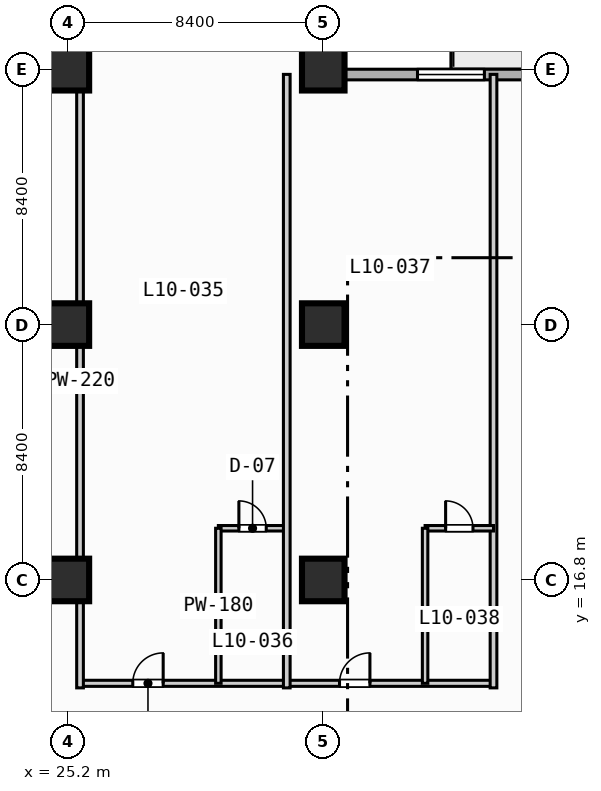
"""IFC4 building model, lengths in metres.
Left out: names, types, materials, properties, quantities, classifications, styles, units other than length and angle.
Written with IfcOpenShell. Run it as: python <this file> out.ifc"""

import sys

from ifc_helpers import new_model, si_unit, direction, frame, frame_2d, origin, origin_2d, place, context, subcontext, project, spatial, rectangle, extrude, element, fill, save


model = new_model("IFC4")
c1 = context("Model", 3, precision=1e-05, world=origin(), true_north=direction((0.0, 1.0)))
c2 = subcontext(c1, "Body", "Model", "MODEL_VIEW")
j1 = project(units=[si_unit("LENGTHUNIT", "METRE"), si_unit("PLANEANGLEUNIT", "RADIAN")], contexts=[c1])
p1 = place(None, origin())
s1 = spatial("IfcSite", under=j1, at=p1, CompositionType="ELEMENT")
p2 = place(p1, origin())
s2 = spatial("IfcBuilding", under=s1, at=p2, CompositionType="ELEMENT")
p3 = place(p2, frame((0.0, 0.0, 47.2)))
s3 = spatial("IfcBuildingStorey", under=s2, at=p3, CompositionType="ELEMENT", Elevation=47.2)
for number, where, z_axis, x_axis in (
    (1, (25.2, 16.8, 0.0), (0.0, 0.0, 1.0), (1.0, 0.0, 0.0)),
    (2, (25.2, 25.2, 0.0), (0.0, 0.0, 1.0), (1.0, 0.0, 0.0)),
    (3, (25.2, 33.6, 0.0), (0.0, 0.0, 1.0), (1.0, 0.0, 0.0)),
    (4, (33.6, 16.8, 0.0), (0.0, 0.0, 1.0), (1.0, 0.0, 0.0)),
    (5, (33.6, 25.2, 0.0), (0.0, 0.0, 1.0), (1.0, 0.0, 0.0)),
    (6, (33.6, 33.6, 0.0), (0.0, 0.0, 1.0), (1.0, 0.0, 0.0)),
):
    element("IfcColumn", number, at=place(p3, frame(where, z_axis=z_axis, x_axis=x_axis)), inside=s3, PredefinedType="COLUMN", context=c2, shape_type="SweptSolid", body=[
        extrude(rectangle(XDim=1.4, YDim=1.4, at=origin_2d()), origin(), (0.0, 0.0, 1.0), 3.8),
    ])
p4 = place(p3, frame((33.425, 89.225, 0.0), z_axis=(0.0, 0.0, 1.0), x_axis=(0.0, -1.0, 0.0)))
e7 = element("IfcWall", 7, at=p4, inside=s3, PredefinedType="STANDARD", context=c2, shape_type="SweptSolid", body=[
    extrude(rectangle(XDim=55.8, YDim=0.35, at=frame_2d((27.9, 0.0))), origin(), (0.0, 0.0, 1.0), 3.55),
])
p5 = place(p4, frame((16.725, 0.0, 0.85)))
e8 = element("IfcOpeningElement", 8, at=p5, cuts=e7, PredefinedType="OPENING", context=c2, shape_type="SweptSolid", body=[
    extrude(rectangle(XDim=2.2, YDim=1.8, at=frame_2d((1.1, 0.9))), frame((0.0, 0.185, 0.0), z_axis=(0.0, -1.0, 0.0), x_axis=(1.0, 0.0, 0.0)), (0.0, 0.0, 1.0), 0.37),
])
p6 = place(p4, frame((8.325, 0.0, 0.85)))
e9 = element("IfcOpeningElement", 9, at=p6, cuts=e7, PredefinedType="OPENING", context=c2, shape_type="SweptSolid", body=[
    extrude(rectangle(XDim=2.2, YDim=1.8, at=frame_2d((1.1, 0.9))), frame((0.0, 0.185, 0.0), z_axis=(0.0, -1.0, 0.0), x_axis=(1.0, 0.0, 0.0)), (0.0, 0.0, 1.0), 0.37),
])
p7 = place(p3, frame((33.425, 33.425, 0.0), z_axis=(0.0, 0.0, 1.0), x_axis=(1.0, 0.0, 0.0)))
e10 = element("IfcWall", 10, at=p7, inside=s3, PredefinedType="STANDARD", context=c2, shape_type="SweptSolid", body=[
    extrude(rectangle(XDim=55.8, YDim=0.35, at=frame_2d((27.9, 0.0))), origin(), (0.0, 0.0, 1.0), 3.55),
])
p8 = place(p7, frame((12.075, 0.0, 0.0)))
e11 = element("IfcOpeningElement", 11, at=p8, cuts=e10, PredefinedType="OPENING", context=c2, shape_type="SweptSolid", body=[
    extrude(rectangle(XDim=1.4, YDim=2.2, at=frame_2d((0.7, 1.1))), frame((0.0, 0.185, 0.0), z_axis=(0.0, -1.0, 0.0), x_axis=(1.0, 0.0, 0.0)), (0.0, 0.0, 1.0), 0.37),
])
p9 = place(p7, frame((3.275, 0.0, 0.85)))
e12 = element("IfcOpeningElement", 12, at=p9, cuts=e10, PredefinedType="OPENING", context=c2, shape_type="SweptSolid", body=[
    extrude(rectangle(XDim=2.2, YDim=1.8, at=frame_2d((1.1, 0.9))), frame((0.0, 0.185, 0.0), z_axis=(0.0, -1.0, 0.0), x_axis=(1.0, 0.0, 0.0)), (0.0, 0.0, 1.0), 0.37),
])
p10 = place(p3, frame((25.6, 13.4, 0.0), z_axis=(0.0, 0.0, 1.0), x_axis=(1.0, 0.0, 0.0)))
e13 = element("IfcWall", 13, at=p10, inside=s3, PredefinedType="PARTITIONING", context=c2, shape_type="SweptSolid", body=[
    extrude(rectangle(XDim=13.6, YDim=0.2, at=frame_2d((6.8, 0.0))), origin(), (0.0, 0.0, 1.0), 3.55),
])
p11 = place(p10, frame((1.735, 0.0, 0.0)))
e14 = element("IfcOpeningElement", 14, at=p11, cuts=e13, PredefinedType="OPENING", context=c2, shape_type="SweptSolid", body=[
    extrude(rectangle(XDim=1.0, YDim=2.15, at=frame_2d((0.5, 1.075))), frame((0.0, 0.11, 0.0), z_axis=(0.0, -1.0, 0.0), x_axis=(1.0, 0.0, 0.0)), (0.0, 0.0, 1.0), 0.22),
])
p12 = place(p10, frame((8.535, 0.0, 0.0)))
e15 = element("IfcOpeningElement", 15, at=p12, cuts=e13, PredefinedType="OPENING", context=c2, shape_type="SweptSolid", body=[
    extrude(rectangle(XDim=1.0, YDim=2.15, at=frame_2d((0.5, 1.075))), frame((0.0, 0.11, 0.0), z_axis=(0.0, -1.0, 0.0), x_axis=(1.0, 0.0, 0.0)), (0.0, 0.0, 1.0), 0.22),
])
p13 = place(p3, frame((25.6, 13.25, 0.0), z_axis=(0.0, 0.0, 1.0), x_axis=(0.0, 1.0, 0.0)))
e16 = element("IfcWall", 16, at=p13, inside=s3, PredefinedType="PARTITIONING", context=c2, shape_type="SweptSolid", body=[
    extrude(rectangle(XDim=20.18, YDim=0.22, at=frame_2d((10.09, 0.0))), origin(), (0.0, 0.0, 1.0), 3.55),
])
p14 = place(p3, frame((30.15, 18.5, 0.0), z_axis=(0.0, 0.0, 1.0), x_axis=(1.0, 0.0, 0.0)))
e17 = element("IfcWall", 17, at=p14, inside=s3, PredefinedType="PLUMBINGWALL", context=c2, shape_type="SweptSolid", body=[
    extrude(rectangle(XDim=2.25, YDim=0.18, at=frame_2d((1.125, 0.0))), origin(), (0.0, 0.0, 1.0), 3.55),
])
p15 = place(p14, frame((0.675, 0.0, 0.0)))
e18 = element("IfcOpeningElement", 18, at=p15, cuts=e17, PredefinedType="OPENING", context=c2, shape_type="SweptSolid", body=[
    extrude(rectangle(XDim=0.9, YDim=2.1, at=frame_2d((0.45, 1.05))), frame((0.0, 0.1, 0.0), z_axis=(0.0, -1.0, 0.0), x_axis=(1.0, 0.0, 0.0)), (0.0, 0.0, 1.0), 0.2),
])
p16 = place(p3, frame((30.15, 13.4, 0.0), z_axis=(0.0, 0.0, 1.0), x_axis=(0.0, 1.0, 0.0)))
e19 = element("IfcWall", 19, at=p16, inside=s3, PredefinedType="PLUMBINGWALL", context=c2, shape_type="SweptSolid", body=[
    extrude(rectangle(XDim=5.1, YDim=0.18, at=frame_2d((2.55, 0.0))), origin(), (0.0, 0.0, 1.0), 3.55),
])
for number, where, z_axis, x_axis in (
    (20, (32.4, 13.25, 0.0), (0.0, 0.0, 1.0), (0.0, 1.0, 0.0)),
    (21, (39.2, 13.25, 0.0), (0.0, 0.0, 1.0), (0.0, 1.0, 0.0)),
):
    element("IfcWall", number, at=place(p3, frame(where, z_axis=z_axis, x_axis=x_axis)), inside=s3, PredefinedType="PARTITIONING", context=c2, shape_type="SweptSolid", body=[
        extrude(rectangle(XDim=20.18, YDim=0.22, at=frame_2d((10.09, 0.0))), origin(), (0.0, 0.0, 1.0), 3.55),
    ])
p17 = place(p3, frame((36.95, 18.5, 0.0), z_axis=(0.0, 0.0, 1.0), x_axis=(1.0, 0.0, 0.0)))
e22 = element("IfcWall", 22, at=p17, inside=s3, PredefinedType="PLUMBINGWALL", context=c2, shape_type="SweptSolid", body=[
    extrude(rectangle(XDim=2.25, YDim=0.18, at=frame_2d((1.125, 0.0))), origin(), (0.0, 0.0, 1.0), 3.55),
])
p18 = place(p17, frame((0.675, 0.0, 0.0)))
e23 = element("IfcOpeningElement", 23, at=p18, cuts=e22, PredefinedType="OPENING", context=c2, shape_type="SweptSolid", body=[
    extrude(rectangle(XDim=0.9, YDim=2.1, at=frame_2d((0.45, 1.05))), frame((0.0, 0.1, 0.0), z_axis=(0.0, -1.0, 0.0), x_axis=(1.0, 0.0, 0.0)), (0.0, 0.0, 1.0), 0.2),
])
p19 = place(p3, frame((36.95, 13.4, 0.0), z_axis=(0.0, 0.0, 1.0), x_axis=(0.0, 1.0, 0.0)))
e24 = element("IfcWall", 24, at=p19, inside=s3, PredefinedType="PLUMBINGWALL", context=c2, shape_type="SweptSolid", body=[
    extrude(rectangle(XDim=5.1, YDim=0.18, at=frame_2d((2.55, 0.0))), origin(), (0.0, 0.0, 1.0), 3.55),
])
p20 = place(p9, origin())
e25 = element("IfcWindow", 25, at=p20, inside=s3, PartitioningType="SINGLE_PANEL", PredefinedType="WINDOW", context=c2, shape_type="SweptSolid", body=[
    extrude(rectangle(XDim=2.2, YDim=1.8, at=frame_2d((1.1, 0.9))), frame((0.0, 0.03, 0.0), z_axis=(0.0, -1.0, 0.0), x_axis=(1.0, 0.0, 0.0)), (0.0, 0.0, 1.0), 0.06),
])
fill(e12, e25)
p21 = place(p11, origin())
e26 = element("IfcDoor", 26, at=p21, inside=s3, OperationType="SINGLE_SWING_RIGHT", PredefinedType="DOOR", context=c2, shape_type="SweptSolid", body=[
    extrude(rectangle(XDim=1.0, YDim=2.15, at=frame_2d((0.5, 1.075))), frame((0.0, 0.025, 0.0), z_axis=(0.0, -1.0, 0.0), x_axis=(1.0, 0.0, 0.0)), (0.0, 0.0, 1.0), 0.05),
])
fill(e14, e26)
p22 = place(p12, origin())
e27 = element("IfcDoor", 27, at=p22, inside=s3, OperationType="SINGLE_SWING_RIGHT", PredefinedType="DOOR", context=c2, shape_type="SweptSolid", body=[
    extrude(rectangle(XDim=1.0, YDim=2.15, at=frame_2d((0.5, 1.075))), frame((0.0, 0.025, 0.0), z_axis=(0.0, -1.0, 0.0), x_axis=(1.0, 0.0, 0.0)), (0.0, 0.0, 1.0), 0.05),
])
fill(e15, e27)
p23 = place(p15, origin())
e28 = element("IfcDoor", 28, at=p23, inside=s3, OperationType="SINGLE_SWING_LEFT", PredefinedType="DOOR", context=c2, shape_type="SweptSolid", body=[
    extrude(rectangle(XDim=0.9, YDim=2.1, at=frame_2d((0.45, 1.05))), frame((0.0, 0.025, 0.0), z_axis=(0.0, -1.0, 0.0), x_axis=(1.0, 0.0, 0.0)), (0.0, 0.0, 1.0), 0.05),
])
fill(e18, e28)
p24 = place(p18, origin())
e29 = element("IfcDoor", 29, at=p24, inside=s3, OperationType="SINGLE_SWING_LEFT", PredefinedType="DOOR", context=c2, shape_type="SweptSolid", body=[
    extrude(rectangle(XDim=0.9, YDim=2.1, at=frame_2d((0.45, 1.05))), frame((0.0, 0.025, 0.0), z_axis=(0.0, -1.0, 0.0), x_axis=(1.0, 0.0, 0.0)), (0.0, 0.0, 1.0), 0.05),
])
fill(e23, e29)
save(model, sys.argv[1])
